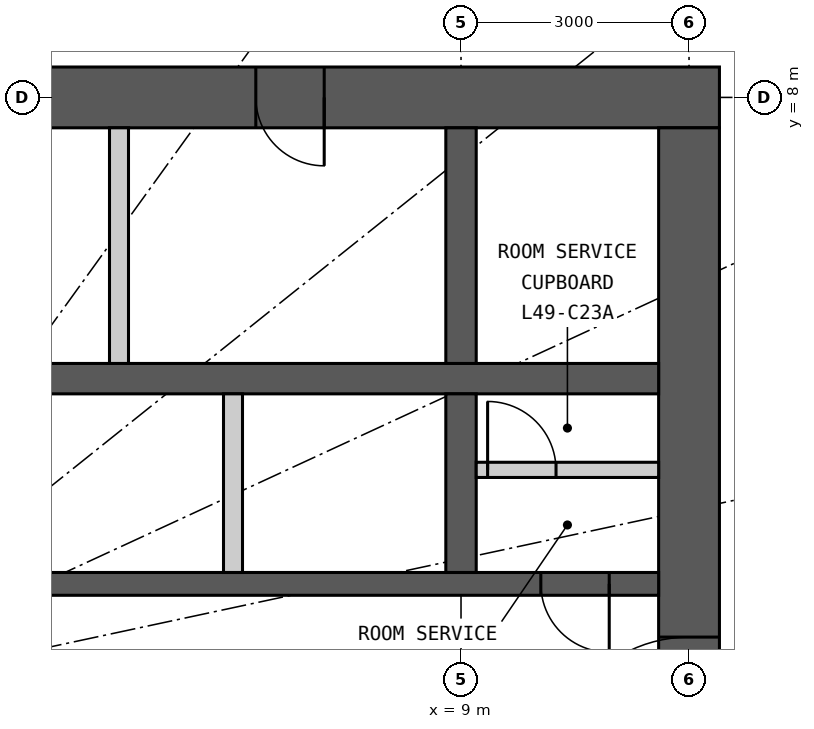
"""IFC4 building model, lengths in metres.
Left out: names, types, materials, properties, quantities, classifications, styles, units other than length and angle.
Written with IfcOpenShell. Run it as: python <this file> out.ifc"""

import sys

from ifc_helpers import new_model, si_unit, direction, frame, frame_2d, origin, place, context, subcontext, project, spatial, rectangle, extrude, element, fill, save


model = new_model("IFC4")
c1 = context("Model", 3, precision=1e-05, world=origin(), true_north=direction((0.0, 1.0)))
c2 = subcontext(c1, "Body", "Model", "MODEL_VIEW")
j1 = project(units=[si_unit("LENGTHUNIT", "METRE"), si_unit("PLANEANGLEUNIT", "RADIAN")], contexts=[c1])
p1 = place(None, origin())
s1 = spatial("IfcSite", under=j1, at=p1, CompositionType="ELEMENT")
p2 = place(p1, origin())
s2 = spatial("IfcBuilding", under=s1, at=p2, CompositionType="ELEMENT")
p3 = place(p2, frame((0.0, 0.0, 183.0)))
s3 = spatial("IfcBuildingStorey", under=s2, at=p3, CompositionType="ELEMENT", Elevation=183.0)
p4 = place(p3, frame((-12.4, 8.0, 0.0), z_axis=(0.0, 0.0, 1.0), x_axis=(1.0, 0.0, 0.0)))
e1 = element("IfcWall", 1, at=p4, inside=s3, PredefinedType="SHEAR", context=c2, shape_type="SweptSolid", body=[
    extrude(rectangle(XDim=24.8, YDim=0.8, at=frame_2d((12.4, 0.0))), origin(), (0.0, 0.0, 1.0), 3.3),
])
p5 = place(p4, frame((11.1, 0.0, 0.0)))
e2 = element("IfcOpeningElement", 2, at=p5, cuts=e1, PredefinedType="OPENING", context=c2, shape_type="SweptSolid", body=[
    extrude(rectangle(XDim=1.2, YDim=2.2, at=frame_2d((0.6, 1.1))), frame((0.0, 0.41, 0.0), z_axis=(0.0, -1.0, 0.0), x_axis=(1.0, 0.0, 0.0)), (0.0, 0.0, 1.0), 0.82),
])
p6 = place(p4, frame((18.7, 0.0, 0.0)))
e3 = element("IfcOpeningElement", 3, at=p6, cuts=e1, PredefinedType="OPENING", context=c2, shape_type="SweptSolid", body=[
    extrude(rectangle(XDim=0.9, YDim=2.2, at=frame_2d((0.45, 1.1))), frame((0.0, 0.41, 0.0), z_axis=(0.0, -1.0, 0.0), x_axis=(1.0, 0.0, 0.0)), (0.0, 0.0, 1.0), 0.82),
])
p7 = place(p3, frame((12.0, -7.6, 0.0), z_axis=(0.0, 0.0, 1.0), x_axis=(0.0, 1.0, 0.0)))
e4 = element("IfcWall", 4, at=p7, inside=s3, PredefinedType="SHEAR", context=c2, shape_type="SweptSolid", body=[
    extrude(rectangle(XDim=15.2, YDim=0.8, at=frame_2d((7.6, 0.0))), origin(), (0.0, 0.0, 1.0), 3.3),
])
p8 = place(p7, frame((6.7, 0.0, 0.0)))
e5 = element("IfcOpeningElement", 5, at=p8, cuts=e4, PredefinedType="OPENING", context=c2, shape_type="SweptSolid", body=[
    extrude(rectangle(XDim=1.8, YDim=2.2, at=frame_2d((0.9, 1.1))), frame((0.0, 0.41, 0.0), z_axis=(0.0, -1.0, 0.0), x_axis=(1.0, 0.0, 0.0)), (0.0, 0.0, 1.0), 0.82),
])
p9 = place(p3, frame((-11.6, 4.3, 0.0), z_axis=(0.0, 0.0, 1.0), x_axis=(1.0, 0.0, 0.0)))
e6 = element("IfcWall", 6, at=p9, inside=s3, PredefinedType="SHEAR", context=c2, shape_type="SweptSolid", body=[
    extrude(rectangle(XDim=23.2, YDim=0.4, at=frame_2d((11.6, 0.0))), origin(), (0.0, 0.0, 1.0), 3.3),
])
p10 = place(p3, frame((-11.6, 1.6, 0.0), z_axis=(0.0, 0.0, 1.0), x_axis=(1.0, 0.0, 0.0)))
e7 = element("IfcWall", 7, at=p10, inside=s3, PredefinedType="SHEAR", context=c2, shape_type="SweptSolid", body=[
    extrude(rectangle(XDim=23.2, YDim=0.3, at=frame_2d((11.6, 0.0))), origin(), (0.0, 0.0, 1.0), 3.3),
])
p11 = place(p10, frame((9.55, 0.0, 0.0)))
e8 = element("IfcOpeningElement", 8, at=p11, cuts=e7, PredefinedType="OPENING", context=c2, shape_type="SweptSolid", body=[
    extrude(rectangle(XDim=1.1, YDim=2.2, at=frame_2d((0.55, 1.1))), frame((0.0, 0.16, 0.0), z_axis=(0.0, -1.0, 0.0), x_axis=(1.0, 0.0, 0.0)), (0.0, 0.0, 1.0), 0.32),
])
p12 = place(p10, frame((12.55, 0.0, 0.0)))
e9 = element("IfcOpeningElement", 9, at=p12, cuts=e7, PredefinedType="OPENING", context=c2, shape_type="SweptSolid", body=[
    extrude(rectangle(XDim=1.1, YDim=2.2, at=frame_2d((0.55, 1.1))), frame((0.0, 0.16, 0.0), z_axis=(0.0, -1.0, 0.0), x_axis=(1.0, 0.0, 0.0)), (0.0, 0.0, 1.0), 0.32),
])
p13 = place(p10, frame((0.65, 0.0, 0.0)))
e10 = element("IfcOpeningElement", 10, at=p13, cuts=e7, PredefinedType="OPENING", context=c2, shape_type="SweptSolid", body=[
    extrude(rectangle(XDim=0.9, YDim=2.2, at=frame_2d((0.45, 1.1))), frame((0.0, 0.16, 0.0), z_axis=(0.0, -1.0, 0.0), x_axis=(1.0, 0.0, 0.0)), (0.0, 0.0, 1.0), 0.32),
])
p14 = place(p10, frame((5.15, 0.0, 0.0)))
e11 = element("IfcOpeningElement", 11, at=p14, cuts=e7, PredefinedType="OPENING", context=c2, shape_type="SweptSolid", body=[
    extrude(rectangle(XDim=0.9, YDim=2.2, at=frame_2d((0.45, 1.1))), frame((0.0, 0.16, 0.0), z_axis=(0.0, -1.0, 0.0), x_axis=(1.0, 0.0, 0.0)), (0.0, 0.0, 1.0), 0.32),
])
p15 = place(p10, frame((21.65, 0.0, 0.0)))
e12 = element("IfcOpeningElement", 12, at=p15, cuts=e7, PredefinedType="OPENING", context=c2, shape_type="SweptSolid", body=[
    extrude(rectangle(XDim=0.9, YDim=2.2, at=frame_2d((0.45, 1.1))), frame((0.0, 0.16, 0.0), z_axis=(0.0, -1.0, 0.0), x_axis=(1.0, 0.0, 0.0)), (0.0, 0.0, 1.0), 0.32),
])
p16 = place(p3, frame((9.0, 4.5, 0.0), z_axis=(0.0, 0.0, 1.0), x_axis=(0.0, 1.0, 0.0)))
e13 = element("IfcWall", 13, at=p16, inside=s3, PredefinedType="SHEAR", context=c2, shape_type="SweptSolid", body=[
    extrude(rectangle(XDim=3.1, YDim=0.4, at=frame_2d((1.55, 0.0))), origin(), (0.0, 0.0, 1.0), 3.3),
])
p17 = place(p3, frame((9.0, 1.75, 0.0), z_axis=(0.0, 0.0, 1.0), x_axis=(0.0, 1.0, 0.0)))
e14 = element("IfcWall", 14, at=p17, inside=s3, PredefinedType="SHEAR", context=c2, shape_type="SweptSolid", body=[
    extrude(rectangle(XDim=2.35, YDim=0.4, at=frame_2d((1.175, 0.0))), origin(), (0.0, 0.0, 1.0), 3.3),
])
p18 = place(p3, frame((4.5, 4.5, 0.0), z_axis=(0.0, 0.0, 1.0), x_axis=(0.0, 1.0, 0.0)))
e15 = element("IfcWall", 15, at=p18, inside=s3, PredefinedType="PARTITIONING", context=c2, shape_type="SweptSolid", body=[
    extrude(rectangle(XDim=3.1, YDim=0.25, at=frame_2d((1.55, 0.0))), origin(), (0.0, 0.0, 1.0), 3.3),
])
p19 = place(p3, frame((6.0, 1.75, 0.0), z_axis=(0.0, 0.0, 1.0), x_axis=(0.0, 1.0, 0.0)))
e16 = element("IfcWall", 16, at=p19, inside=s3, PredefinedType="PARTITIONING", context=c2, shape_type="SweptSolid", body=[
    extrude(rectangle(XDim=2.35, YDim=0.25, at=frame_2d((1.175, 0.0))), origin(), (0.0, 0.0, 1.0), 3.3),
])
p20 = place(p3, frame((9.2, 3.1, 0.0), z_axis=(0.0, 0.0, 1.0), x_axis=(1.0, 0.0, 0.0)))
e17 = element("IfcWall", 17, at=p20, inside=s3, PredefinedType="PARTITIONING", context=c2, shape_type="SweptSolid", body=[
    extrude(rectangle(XDim=2.4, YDim=0.2, at=frame_2d((1.2, 0.0))), origin(), (0.0, 0.0, 1.0), 3.05),
])
p21 = place(p20, frame((0.15, 0.0, 0.0)))
e18 = element("IfcOpeningElement", 18, at=p21, cuts=e17, PredefinedType="OPENING", context=c2, shape_type="SweptSolid", body=[
    extrude(rectangle(XDim=0.9, YDim=2.2, at=frame_2d((0.45, 1.1))), frame((0.0, 0.11, 0.0), z_axis=(0.0, -1.0, 0.0), x_axis=(1.0, 0.0, 0.0)), (0.0, 0.0, 1.0), 0.22),
])
p22 = place(p6, origin())
e19 = element("IfcDoor", 19, at=p22, inside=s3, OperationType="SINGLE_SWING_RIGHT", PredefinedType="DOOR", context=c2, shape_type="SweptSolid", body=[
    extrude(rectangle(XDim=0.9, YDim=2.2, at=frame_2d((0.45, 1.1))), frame((0.0, 0.025, 0.0), z_axis=(0.0, -1.0, 0.0), x_axis=(1.0, 0.0, 0.0)), (0.0, 0.0, 1.0), 0.05),
])
fill(e3, e19)
p23 = place(p15, origin())
e20 = element("IfcDoor", 20, at=p23, inside=s3, OperationType="SINGLE_SWING_RIGHT", PredefinedType="DOOR", context=c2, shape_type="SweptSolid", body=[
    extrude(rectangle(XDim=0.9, YDim=2.2, at=frame_2d((0.45, 1.1))), frame((0.0, 0.025, 0.0), z_axis=(0.0, -1.0, 0.0), x_axis=(1.0, 0.0, 0.0)), (0.0, 0.0, 1.0), 0.05),
])
fill(e12, e20)
p24 = place(p21, origin())
e21 = element("IfcDoor", 21, at=p24, inside=s3, OperationType="SINGLE_SWING_LEFT", PredefinedType="DOOR", context=c2, shape_type="SweptSolid", body=[
    extrude(rectangle(XDim=0.9, YDim=2.2, at=frame_2d((0.45, 1.1))), frame((0.0, 0.025, 0.0), z_axis=(0.0, -1.0, 0.0), x_axis=(1.0, 0.0, 0.0)), (0.0, 0.0, 1.0), 0.05),
])
fill(e18, e21)
p25 = place(p8, origin())
e22 = element("IfcDoor", 22, at=p25, inside=s3, OperationType="DOUBLE_DOOR_DOUBLE_SWING", PredefinedType="DOOR", context=c2, shape_type="SweptSolid", body=[
    extrude(rectangle(XDim=1.8, YDim=2.2, at=frame_2d((0.9, 1.1))), frame((0.0, 0.025, 0.0), z_axis=(0.0, -1.0, 0.0), x_axis=(1.0, 0.0, 0.0)), (0.0, 0.0, 1.0), 0.05),
])
fill(e5, e22)
save(model, sys.argv[1])
